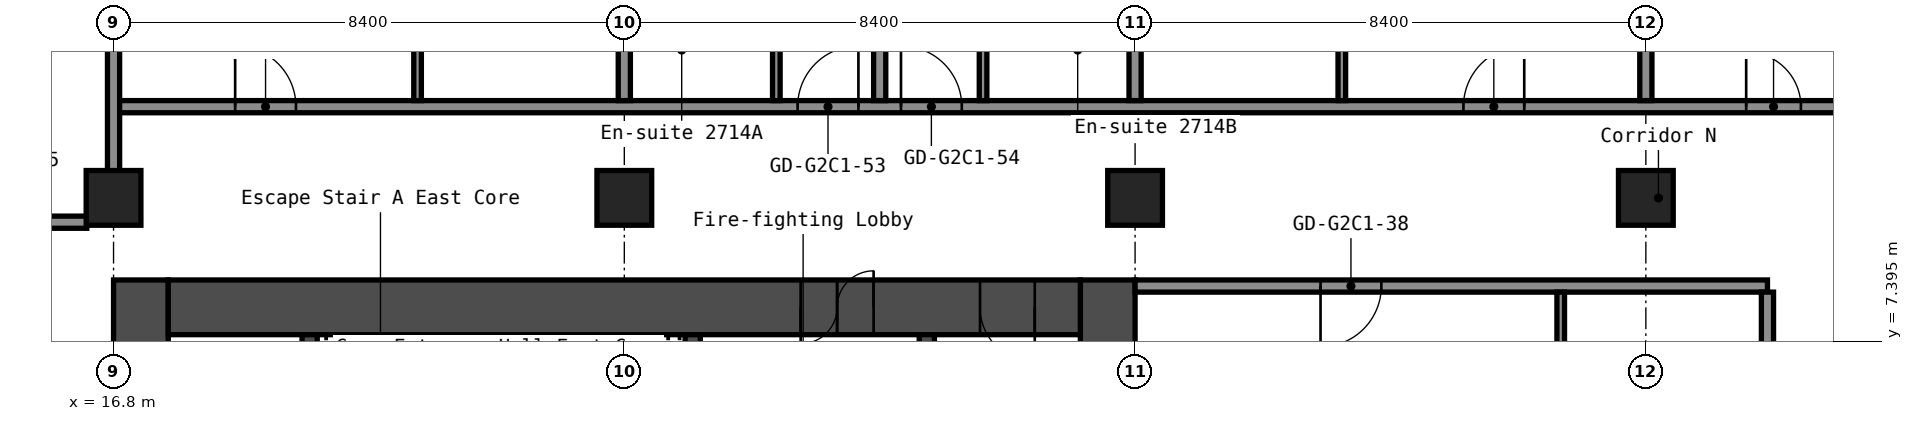
"""IFC4 building model, lengths in metres.
Left out: names, types, materials, properties, quantities, classifications, styles, units other than length and angle.
Written with IfcOpenShell. Run it as: python <this file> out.ifc"""

import sys

from ifc_helpers import new_model, si_unit, direction, frame, frame_2d, origin, origin_2d, place, context, subcontext, project, spatial, rectangle, hollow_rectangle, extrude, element, fill, save


model = new_model("IFC4")
c1 = context("Model", 3, precision=1e-05, world=origin(), true_north=direction((0.0, 1.0)))
c2 = subcontext(c1, "Body", "Model", "MODEL_VIEW")
j1 = project(units=[si_unit("LENGTHUNIT", "METRE"), si_unit("PLANEANGLEUNIT", "RADIAN")], contexts=[c1])
p1 = place(None, origin())
s1 = spatial("IfcSite", under=j1, at=p1, CompositionType="ELEMENT")
p2 = place(p1, origin())
s2 = spatial("IfcBuilding", under=s1, at=p2, CompositionType="ELEMENT")
p3 = place(p2, frame((0.0, 0.0, 97.8)))
s3 = spatial("IfcBuildingStorey", under=s2, at=p3, CompositionType="ELEMENT", Elevation=97.8)
for number, where, z_axis, x_axis in (
    (1, (16.8, 9.75, 0.0), (0.0, 0.0, 1.0), (1.0, 0.0, 0.0)),
    (2, (25.2, 9.75, 0.0), (0.0, 0.0, 1.0), (1.0, 0.0, 0.0)),
    (3, (33.6, 9.75, 0.0), (0.0, 0.0, 1.0), (1.0, 0.0, 0.0)),
    (4, (42.0, 9.75, 0.0), (0.0, 0.0, 1.0), (1.0, 0.0, 0.0)),
):
    element("IfcColumn", number, at=place(p3, frame(where, z_axis=z_axis, x_axis=x_axis)), inside=s3, PredefinedType="COLUMN", context=c2, shape_type="SweptSolid", body=[
        extrude(hollow_rectangle(XDim=0.9, YDim=0.9, WallThickness=0.036, at=origin_2d()), origin(), (0.0, 0.0, 1.0), 2.8),
    ])
p4 = place(p3, frame((17.25, -8.4, 0.0), z_axis=(0.0, 0.0, 1.0), x_axis=(0.0, 1.0, 0.0)))
e5 = element("IfcWall", 5, at=p4, inside=s3, PredefinedType="SHEAR", context=c2, shape_type="SweptSolid", body=[
    extrude(rectangle(XDim=16.8, YDim=0.9, at=frame_2d((8.4, 0.0))), origin(), (0.0, 0.0, 1.0), 2.8),
])
p5 = place(p4, frame((7.6, 0.0, 0.0)))
e6 = element("IfcOpeningElement", 6, at=p5, cuts=e5, PredefinedType="OPENING", context=c2, shape_type="SweptSolid", body=[
    extrude(rectangle(XDim=1.2, YDim=2.1, at=frame_2d((0.6, 1.05))), frame((0.0, 0.46, 0.0), z_axis=(0.0, -1.0, 0.0), x_axis=(1.0, 0.0, 0.0)), (0.0, 0.0, 1.0), 0.92),
])
p6 = place(p3, frame((33.15, -8.4, 0.0), z_axis=(0.0, 0.0, 1.0), x_axis=(0.0, 1.0, 0.0)))
e7 = element("IfcWall", 7, at=p6, inside=s3, PredefinedType="SHEAR", context=c2, shape_type="SweptSolid", body=[
    extrude(rectangle(XDim=16.8, YDim=0.9, at=frame_2d((8.4, 0.0))), origin(), (0.0, 0.0, 1.0), 2.8),
])
p7 = place(p3, frame((17.7, 7.95, 0.0), z_axis=(0.0, 0.0, 1.0), x_axis=(1.0, 0.0, 0.0)))
e8 = element("IfcWall", 8, at=p7, inside=s3, PredefinedType="SHEAR", context=c2, shape_type="SweptSolid", body=[
    extrude(rectangle(XDim=15.0, YDim=0.9, at=frame_2d((7.5, 0.0))), origin(), (0.0, 0.0, 1.0), 2.8),
])
p8 = place(p7, frame((10.4, 0.0, 0.0)))
e9 = element("IfcOpeningElement", 9, at=p8, cuts=e8, PredefinedType="OPENING", context=c2, shape_type="SweptSolid", body=[
    extrude(rectangle(XDim=1.2, YDim=2.1, at=frame_2d((0.6, 1.05))), frame((0.0, 0.46, 0.0), z_axis=(0.0, -1.0, 0.0), x_axis=(1.0, 0.0, 0.0)), (0.0, 0.0, 1.0), 0.92),
])
p9 = place(p7, frame((13.35, 0.0, 0.0)))
e10 = element("IfcOpeningElement", 10, at=p9, cuts=e8, PredefinedType="OPENING", context=c2, shape_type="SweptSolid", body=[
    extrude(rectangle(XDim=0.9, YDim=2.1, at=frame_2d((0.45, 1.05))), frame((0.0, 0.46, 0.0), z_axis=(0.0, -1.0, 0.0), x_axis=(1.0, 0.0, 0.0)), (0.0, 0.0, 1.0), 0.92),
])
p10 = place(p3, frame((20.025, 1.2, 0.0), z_axis=(0.0, 0.0, 1.0), x_axis=(0.0, 1.0, 0.0)))
e11 = element("IfcWall", 11, at=p10, inside=s3, PredefinedType="SHEAR", context=c2, shape_type="SweptSolid", body=[
    extrude(rectangle(XDim=6.3, YDim=0.25, at=frame_2d((3.15, 0.0))), origin(), (0.0, 0.0, 1.0), 2.8),
])
p11 = place(p3, frame((26.325, 3.75, 0.0), z_axis=(0.0, 0.0, 1.0), x_axis=(0.0, 1.0, 0.0)))
e12 = element("IfcWall", 12, at=p11, inside=s3, PredefinedType="SHEAR", context=c2, shape_type="SweptSolid", body=[
    extrude(rectangle(XDim=3.75, YDim=0.25, at=frame_2d((1.875, 0.0))), origin(), (0.0, 0.0, 1.0), 2.8),
])
p12 = place(p11, frame((1.25, 0.0, 0.0)))
e13 = element("IfcOpeningElement", 13, at=p12, cuts=e12, PredefinedType="OPENING", context=c2, shape_type="SweptSolid", body=[
    extrude(rectangle(XDim=1.2, YDim=2.1, at=frame_2d((0.6, 1.05))), frame((0.0, 0.135, 0.0), z_axis=(0.0, -1.0, 0.0), x_axis=(1.0, 0.0, 0.0)), (0.0, 0.0, 1.0), 0.27),
])
p13 = place(p3, frame((30.175, 1.45, 0.0), z_axis=(0.0, 0.0, 1.0), x_axis=(0.0, 1.0, 0.0)))
e14 = element("IfcWall", 14, at=p13, inside=s3, PredefinedType="SHEAR", context=c2, shape_type="SweptSolid", body=[
    extrude(rectangle(XDim=6.05, YDim=0.25, at=frame_2d((3.025, 0.0))), origin(), (0.0, 0.0, 1.0), 2.8),
])
p14 = place(p13, frame((2.625, 0.0, 0.0)))
e15 = element("IfcOpeningElement", 15, at=p14, cuts=e14, PredefinedType="OPENING", context=c2, shape_type="SweptSolid", body=[
    extrude(rectangle(XDim=1.1, YDim=2.1, at=frame_2d((0.55, 1.05))), frame((0.0, 0.135, 0.0), z_axis=(0.0, -1.0, 0.0), x_axis=(1.0, 0.0, 0.0)), (0.0, 0.0, 1.0), 0.27),
])
p15 = place(p3, frame((33.6, 8.3, 0.0), z_axis=(0.0, 0.0, 1.0), x_axis=(1.0, 0.0, 0.0)))
e16 = element("IfcWall", 16, at=p15, inside=s3, PredefinedType="PARTITIONING", context=c2, shape_type="SweptSolid", body=[
    extrude(rectangle(XDim=10.4, YDim=0.2, at=frame_2d((5.2, 0.0))), origin(), (0.0, 0.0, 1.0), 2.8),
])
p16 = place(p15, frame((3.05, 0.0, 0.0)))
e17 = element("IfcOpeningElement", 17, at=p16, cuts=e16, PredefinedType="OPENING", context=c2, shape_type="SweptSolid", body=[
    extrude(rectangle(XDim=1.0, YDim=2.1, at=frame_2d((0.5, 1.05))), frame((0.0, 0.11, 0.0), z_axis=(0.0, -1.0, 0.0), x_axis=(1.0, 0.0, 0.0)), (0.0, 0.0, 1.0), 0.22),
])
p17 = place(p3, frame((-16.36, 9.35, 0.0), z_axis=(0.0, 0.0, 1.0), x_axis=(1.0, 0.0, 0.0)))
e18 = element("IfcWall", 18, at=p17, inside=s3, PredefinedType="PARTITIONING", context=c2, shape_type="SweptSolid", body=[
    extrude(rectangle(XDim=32.72, YDim=0.2, at=frame_2d((16.36, 0.0))), origin(), (0.0, 0.0, 1.0), 2.8),
])
p18 = place(p17, frame((1.56, 0.0, 0.0)))
e19 = element("IfcOpeningElement", 19, at=p18, cuts=e18, PredefinedType="OPENING", context=c2, shape_type="SweptSolid", body=[
    extrude(rectangle(XDim=1.0, YDim=2.1, at=frame_2d((0.5, 1.05))), frame((0.0, 0.11, 0.0), z_axis=(0.0, -1.0, 0.0), x_axis=(1.0, 0.0, 0.0)), (0.0, 0.0, 1.0), 0.22),
])
p19 = place(p17, frame((10.81, 0.0, 0.0)))
e20 = element("IfcOpeningElement", 20, at=p19, cuts=e18, PredefinedType="OPENING", context=c2, shape_type="SweptSolid", body=[
    extrude(rectangle(XDim=1.0, YDim=2.1, at=frame_2d((0.5, 1.05))), frame((0.0, 0.11, 0.0), z_axis=(0.0, -1.0, 0.0), x_axis=(1.0, 0.0, 0.0)), (0.0, 0.0, 1.0), 0.22),
])
p20 = place(p17, frame((12.51, 0.0, 0.0)))
e21 = element("IfcOpeningElement", 21, at=p20, cuts=e18, PredefinedType="OPENING", context=c2, shape_type="SweptSolid", body=[
    extrude(rectangle(XDim=1.0, YDim=2.1, at=frame_2d((0.5, 1.05))), frame((0.0, 0.11, 0.0), z_axis=(0.0, -1.0, 0.0), x_axis=(1.0, 0.0, 0.0)), (0.0, 0.0, 1.0), 0.22),
])
p21 = place(p17, frame((17.59, 0.0, 0.0)))
e22 = element("IfcOpeningElement", 22, at=p21, cuts=e18, PredefinedType="OPENING", context=c2, shape_type="SweptSolid", body=[
    extrude(rectangle(XDim=0.9, YDim=2.1, at=frame_2d((0.45, 1.05))), frame((0.0, 0.11, 0.0), z_axis=(0.0, -1.0, 0.0), x_axis=(1.0, 0.0, 0.0)), (0.0, 0.0, 1.0), 0.22),
])
p22 = place(p17, frame((21.79, 0.0, 0.0)))
e23 = element("IfcOpeningElement", 23, at=p22, cuts=e18, PredefinedType="OPENING", context=c2, shape_type="SweptSolid", body=[
    extrude(rectangle(XDim=0.9, YDim=2.1, at=frame_2d((0.45, 1.05))), frame((0.0, 0.11, 0.0), z_axis=(0.0, -1.0, 0.0), x_axis=(1.0, 0.0, 0.0)), (0.0, 0.0, 1.0), 0.22),
])
p23 = place(p17, frame((26.66, 0.0, 0.0)))
e24 = element("IfcOpeningElement", 24, at=p23, cuts=e18, PredefinedType="OPENING", context=c2, shape_type="SweptSolid", body=[
    extrude(rectangle(XDim=0.9, YDim=2.1, at=frame_2d((0.45, 1.05))), frame((0.0, 0.11, 0.0), z_axis=(0.0, -1.0, 0.0), x_axis=(1.0, 0.0, 0.0)), (0.0, 0.0, 1.0), 0.22),
])
p24 = place(p17, frame((30.86, 0.0, 0.0)))
e25 = element("IfcOpeningElement", 25, at=p24, cuts=e18, PredefinedType="OPENING", context=c2, shape_type="SweptSolid", body=[
    extrude(rectangle(XDim=0.9, YDim=2.1, at=frame_2d((0.45, 1.05))), frame((0.0, 0.11, 0.0), z_axis=(0.0, -1.0, 0.0), x_axis=(1.0, 0.0, 0.0)), (0.0, 0.0, 1.0), 0.22),
])
p25 = place(p3, frame((16.8, 11.25, 0.0), z_axis=(0.0, 0.0, 1.0), x_axis=(1.0, 0.0, 0.0)))
e26 = element("IfcWall", 26, at=p25, inside=s3, PredefinedType="PARTITIONING", context=c2, shape_type="SweptSolid", body=[
    extrude(rectangle(XDim=29.7, YDim=0.2, at=frame_2d((14.85, 0.0))), origin(), (0.0, 0.0, 1.0), 2.8),
])
p26 = place(p25, frame((2.0, 0.0, 0.0)))
e27 = element("IfcOpeningElement", 27, at=p26, cuts=e26, PredefinedType="OPENING", context=c2, shape_type="SweptSolid", body=[
    extrude(rectangle(XDim=1.0, YDim=2.1, at=frame_2d((0.5, 1.05))), frame((0.0, 0.11, 0.0), z_axis=(0.0, -1.0, 0.0), x_axis=(1.0, 0.0, 0.0)), (0.0, 0.0, 1.0), 0.22),
])
p27 = place(p25, frame((11.25, 0.0, 0.0)))
e28 = element("IfcOpeningElement", 28, at=p27, cuts=e26, PredefinedType="OPENING", context=c2, shape_type="SweptSolid", body=[
    extrude(rectangle(XDim=1.0, YDim=2.1, at=frame_2d((0.5, 1.05))), frame((0.0, 0.11, 0.0), z_axis=(0.0, -1.0, 0.0), x_axis=(1.0, 0.0, 0.0)), (0.0, 0.0, 1.0), 0.22),
])
p28 = place(p25, frame((12.95, 0.0, 0.0)))
e29 = element("IfcOpeningElement", 29, at=p28, cuts=e26, PredefinedType="OPENING", context=c2, shape_type="SweptSolid", body=[
    extrude(rectangle(XDim=1.0, YDim=2.1, at=frame_2d((0.5, 1.05))), frame((0.0, 0.11, 0.0), z_axis=(0.0, -1.0, 0.0), x_axis=(1.0, 0.0, 0.0)), (0.0, 0.0, 1.0), 0.22),
])
p29 = place(p25, frame((22.2, 0.0, 0.0)))
e30 = element("IfcOpeningElement", 30, at=p29, cuts=e26, PredefinedType="OPENING", context=c2, shape_type="SweptSolid", body=[
    extrude(rectangle(XDim=1.0, YDim=2.1, at=frame_2d((0.5, 1.05))), frame((0.0, 0.11, 0.0), z_axis=(0.0, -1.0, 0.0), x_axis=(1.0, 0.0, 0.0)), (0.0, 0.0, 1.0), 0.22),
])
p30 = place(p25, frame((26.85, 0.0, 0.0)))
e31 = element("IfcOpeningElement", 31, at=p30, cuts=e26, PredefinedType="OPENING", context=c2, shape_type="SweptSolid", body=[
    extrude(rectangle(XDim=0.9, YDim=2.1, at=frame_2d((0.45, 1.05))), frame((0.0, 0.11, 0.0), z_axis=(0.0, -1.0, 0.0), x_axis=(1.0, 0.0, 0.0)), (0.0, 0.0, 1.0), 0.22),
])
p31 = place(p3, frame((16.8, 10.19, 0.0), z_axis=(0.0, 0.0, 1.0), x_axis=(0.0, 1.0, 0.0)))
e32 = element("IfcWall", 32, at=p31, inside=s3, PredefinedType="PARTITIONING", context=c2, shape_type="SweptSolid", body=[
    extrude(rectangle(XDim=13.36, YDim=0.2, at=frame_2d((6.68, 0.0))), origin(), (0.0, 0.0, 1.0), 2.8),
])
p32 = place(p3, frame((21.8, 11.35, 0.0), z_axis=(0.0, 0.0, 1.0), x_axis=(0.0, 1.0, 0.0)))
e33 = element("IfcWall", 33, at=p32, inside=s3, PredefinedType="PARTITIONING", context=c2, shape_type="SweptSolid", body=[
    extrude(rectangle(XDim=3.3, YDim=0.125, at=frame_2d((1.65, 0.0))), origin(), (0.0, 0.0, 1.0), 2.8),
])
p33 = place(p3, frame((25.2, 11.35, 0.0), z_axis=(0.0, 0.0, 1.0), x_axis=(0.0, 1.0, 0.0)))
e34 = element("IfcWall", 34, at=p33, inside=s3, PredefinedType="PARTITIONING", context=c2, shape_type="SweptSolid", body=[
    extrude(rectangle(XDim=12.2, YDim=0.2, at=frame_2d((6.1, 0.0))), origin(), (0.0, 0.0, 1.0), 2.8),
])
p34 = place(p3, frame((27.7, 11.35, 0.0), z_axis=(0.0, 0.0, 1.0), x_axis=(0.0, 1.0, 0.0)))
e35 = element("IfcWall", 35, at=p34, inside=s3, PredefinedType="PARTITIONING", context=c2, shape_type="SweptSolid", body=[
    extrude(rectangle(XDim=2.9, YDim=0.125, at=frame_2d((1.45, 0.0))), origin(), (0.0, 0.0, 1.0), 2.8),
])
p35 = place(p34, frame((1.5, 0.0, 0.0)))
e36 = element("IfcOpeningElement", 36, at=p35, cuts=e35, PredefinedType="OPENING", context=c2, shape_type="SweptSolid", body=[
    extrude(rectangle(XDim=0.8, YDim=2.1, at=frame_2d((0.4, 1.05))), frame((0.0, 0.073, 0.0), z_axis=(0.0, -1.0, 0.0), x_axis=(1.0, 0.0, 0.0)), (0.0, 0.0, 1.0), 0.145),
])
p36 = place(p3, frame((29.4, 11.35, 0.0), z_axis=(0.0, 0.0, 1.0), x_axis=(0.0, 1.0, 0.0)))
e37 = element("IfcWall", 37, at=p36, inside=s3, PredefinedType="PARTITIONING", context=c2, shape_type="SweptSolid", body=[
    extrude(rectangle(XDim=12.2, YDim=0.2, at=frame_2d((6.1, 0.0))), origin(), (0.0, 0.0, 1.0), 2.8),
])
p37 = place(p3, frame((31.1, 11.35, 0.0), z_axis=(0.0, 0.0, 1.0), x_axis=(0.0, 1.0, 0.0)))
e38 = element("IfcWall", 38, at=p37, inside=s3, PredefinedType="PARTITIONING", context=c2, shape_type="SweptSolid", body=[
    extrude(rectangle(XDim=2.9, YDim=0.125, at=frame_2d((1.45, 0.0))), origin(), (0.0, 0.0, 1.0), 2.8),
])
p38 = place(p37, frame((1.5, 0.0, 0.0)))
e39 = element("IfcOpeningElement", 39, at=p38, cuts=e38, PredefinedType="OPENING", context=c2, shape_type="SweptSolid", body=[
    extrude(rectangle(XDim=0.8, YDim=2.1, at=frame_2d((0.4, 1.05))), frame((0.0, 0.073, 0.0), z_axis=(0.0, -1.0, 0.0), x_axis=(1.0, 0.0, 0.0)), (0.0, 0.0, 1.0), 0.145),
])
p39 = place(p3, frame((33.6, 11.35, 0.0), z_axis=(0.0, 0.0, 1.0), x_axis=(0.0, 1.0, 0.0)))
e40 = element("IfcWall", 40, at=p39, inside=s3, PredefinedType="PARTITIONING", context=c2, shape_type="SweptSolid", body=[
    extrude(rectangle(XDim=12.2, YDim=0.2, at=frame_2d((6.1, 0.0))), origin(), (0.0, 0.0, 1.0), 2.8),
])
p40 = place(p3, frame((37.0, 11.35, 0.0), z_axis=(0.0, 0.0, 1.0), x_axis=(0.0, 1.0, 0.0)))
e41 = element("IfcWall", 41, at=p40, inside=s3, PredefinedType="PARTITIONING", context=c2, shape_type="SweptSolid", body=[
    extrude(rectangle(XDim=3.3, YDim=0.125, at=frame_2d((1.65, 0.0))), origin(), (0.0, 0.0, 1.0), 2.8),
])
p41 = place(p3, frame((40.6, 4.9, 0.0), z_axis=(0.0, 0.0, 1.0), x_axis=(0.0, 1.0, 0.0)))
e42 = element("IfcWall", 42, at=p41, inside=s3, PredefinedType="PARTITIONING", context=c2, shape_type="SweptSolid", body=[
    extrude(rectangle(XDim=3.3, YDim=0.125, at=frame_2d((1.65, 0.0))), origin(), (0.0, 0.0, 1.0), 2.8),
])
p42 = place(p3, frame((42.0, 11.35, 0.0), z_axis=(0.0, 0.0, 1.0), x_axis=(0.0, 1.0, 0.0)))
e43 = element("IfcWall", 43, at=p42, inside=s3, PredefinedType="PARTITIONING", context=c2, shape_type="SweptSolid", body=[
    extrude(rectangle(XDim=12.2, YDim=0.2, at=frame_2d((6.1, 0.0))), origin(), (0.0, 0.0, 1.0), 2.8),
])
p43 = place(p3, frame((44.0, -8.2, 0.0), z_axis=(0.0, 0.0, 1.0), x_axis=(0.0, 1.0, 0.0)))
e44 = element("IfcWall", 44, at=p43, inside=s3, PredefinedType="PARTITIONING", context=c2, shape_type="SweptSolid", body=[
    extrude(rectangle(XDim=16.4, YDim=0.2, at=frame_2d((8.2, 0.0))), origin(), (0.0, 0.0, 1.0), 2.8),
])
p44 = place(p8, origin())
e45 = element("IfcDoor", 45, at=p44, inside=s3, OperationType="DOUBLE_DOOR_SINGLE_SWING", PredefinedType="DOOR", context=c2, shape_type="SweptSolid", body=[
    extrude(rectangle(XDim=1.2, YDim=2.1, at=frame_2d((0.6, 1.05))), frame((0.0, 0.025, 0.0), z_axis=(0.0, -1.0, 0.0), x_axis=(1.0, 0.0, 0.0)), (0.0, 0.0, 1.0), 0.05),
])
fill(e9, e45)
p45 = place(p9, origin())
e46 = element("IfcDoor", 46, at=p45, inside=s3, OperationType="SINGLE_SWING_RIGHT", PredefinedType="DOOR", context=c2, shape_type="SweptSolid", body=[
    extrude(rectangle(XDim=0.9, YDim=2.1, at=frame_2d((0.45, 1.05))), frame((0.0, 0.025, 0.0), z_axis=(0.0, -1.0, 0.0), x_axis=(1.0, 0.0, 0.0)), (0.0, 0.0, 1.0), 0.05),
])
fill(e10, e46)
p46 = place(p16, origin())
e47 = element("IfcDoor", 47, at=p46, inside=s3, OperationType="SINGLE_SWING_LEFT", PredefinedType="DOOR", context=c2, shape_type="SweptSolid", body=[
    extrude(rectangle(XDim=1.0, YDim=2.1, at=frame_2d((0.5, 1.05))), frame((0.0, 0.025, 0.0), z_axis=(0.0, -1.0, 0.0), x_axis=(1.0, 0.0, 0.0)), (0.0, 0.0, 1.0), 0.05),
])
fill(e17, e47)
p47 = place(p26, origin())
e48 = element("IfcDoor", 48, at=p47, inside=s3, OperationType="SINGLE_SWING_RIGHT", PredefinedType="DOOR", context=c2, shape_type="SweptSolid", body=[
    extrude(rectangle(XDim=1.0, YDim=2.1, at=frame_2d((0.5, 1.05))), frame((0.0, 0.025, 0.0), z_axis=(0.0, -1.0, 0.0), x_axis=(1.0, 0.0, 0.0)), (0.0, 0.0, 1.0), 0.05),
])
fill(e27, e48)
p48 = place(p27, origin())
e49 = element("IfcDoor", 49, at=p48, inside=s3, OperationType="SINGLE_SWING_LEFT", PredefinedType="DOOR", context=c2, shape_type="SweptSolid", body=[
    extrude(rectangle(XDim=1.0, YDim=2.1, at=frame_2d((0.5, 1.05))), frame((0.0, 0.025, 0.0), z_axis=(0.0, -1.0, 0.0), x_axis=(1.0, 0.0, 0.0)), (0.0, 0.0, 1.0), 0.05),
])
fill(e28, e49)
p49 = place(p28, origin())
e50 = element("IfcDoor", 50, at=p49, inside=s3, OperationType="SINGLE_SWING_RIGHT", PredefinedType="DOOR", context=c2, shape_type="SweptSolid", body=[
    extrude(rectangle(XDim=1.0, YDim=2.1, at=frame_2d((0.5, 1.05))), frame((0.0, 0.025, 0.0), z_axis=(0.0, -1.0, 0.0), x_axis=(1.0, 0.0, 0.0)), (0.0, 0.0, 1.0), 0.05),
])
fill(e29, e50)
p50 = place(p29, origin())
e51 = element("IfcDoor", 51, at=p50, inside=s3, OperationType="SINGLE_SWING_LEFT", PredefinedType="DOOR", context=c2, shape_type="SweptSolid", body=[
    extrude(rectangle(XDim=1.0, YDim=2.1, at=frame_2d((0.5, 1.05))), frame((0.0, 0.025, 0.0), z_axis=(0.0, -1.0, 0.0), x_axis=(1.0, 0.0, 0.0)), (0.0, 0.0, 1.0), 0.05),
])
fill(e30, e51)
p51 = place(p30, origin())
e52 = element("IfcDoor", 52, at=p51, inside=s3, OperationType="SINGLE_SWING_RIGHT", PredefinedType="DOOR", context=c2, shape_type="SweptSolid", body=[
    extrude(rectangle(XDim=0.9, YDim=2.1, at=frame_2d((0.45, 1.05))), frame((0.0, 0.025, 0.0), z_axis=(0.0, -1.0, 0.0), x_axis=(1.0, 0.0, 0.0)), (0.0, 0.0, 1.0), 0.05),
])
fill(e31, e52)
save(model, sys.argv[1])
